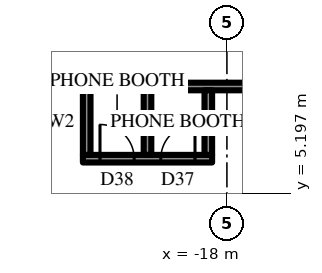
"""IFC4 building model, lengths in metres.
Left out: names, types, materials, properties, quantities, classifications, styles, units other than length and angle.
Written with IfcOpenShell. Run it as: python <this file> out.ifc"""

import sys

from ifc_helpers import new_model, si_unit, direction, frame, frame_2d, origin, place, context, subcontext, project, spatial, rectangle, extrude, element, fill, save


model = new_model("IFC4")
c1 = context("Model", 3, precision=1e-05, world=origin(), true_north=direction((0.0, 1.0)))
c2 = subcontext(c1, "Body", "Model", "MODEL_VIEW")
j1 = project(units=[si_unit("LENGTHUNIT", "METRE"), si_unit("PLANEANGLEUNIT", "RADIAN")], contexts=[c1])
p1 = place(None, origin())
s1 = spatial("IfcSite", under=j1, at=p1, CompositionType="ELEMENT")
p2 = place(p1, origin())
s2 = spatial("IfcBuilding", under=s1, at=p2, CompositionType="ELEMENT")
p3 = place(p2, frame((0.0, 0.0, 249.1)))
s3 = spatial("IfcBuildingStorey", under=s2, at=p3, CompositionType="ELEMENT", Elevation=249.1)
p4 = place(p3, frame((-15.5, 8.0, 0.0), z_axis=(0.0, 0.0, 1.0), x_axis=(-1.0, 0.0, 0.0)))
e1 = element("IfcWall", 1, at=p4, inside=s3, PredefinedType="PARTITIONING", context=c2, shape_type="SweptSolid", body=[
    extrude(rectangle(XDim=13.113, YDim=0.2, at=frame_2d((6.557, 0.0))), origin(), (0.0, 0.0, 1.0), 4.0),
])
p5 = place(p4, frame((0.811, 0.0, 0.0)))
e2 = element("IfcOpeningElement", 2, at=p5, cuts=e1, PredefinedType="OPENING", context=c2, shape_type="SweptSolid", body=[
    extrude(rectangle(XDim=1.0, YDim=2.2, at=frame_2d((0.5, 1.1))), frame((0.0, 0.11, 0.0), z_axis=(0.0, -1.0, 0.0), x_axis=(1.0, 0.0, 0.0)), (0.0, 0.0, 1.0), 0.22),
])
p6 = place(p3, frame((-18.39, 6.1, 0.0), z_axis=(0.0, 0.0, 1.0), x_axis=(-1.0, 0.0, 0.0)))
e3 = element("IfcWall", 3, at=p6, inside=s3, PredefinedType="PARTITIONING", context=c2, shape_type="SweptSolid", body=[
    extrude(rectangle(XDim=3.4, YDim=0.2, at=frame_2d((1.7, 0.0))), origin(), (0.0, 0.0, 1.0), 4.0),
])
p7 = place(p6, frame((0.45, 0.0, 0.0)))
e4 = element("IfcOpeningElement", 4, at=p7, cuts=e3, PredefinedType="OPENING", context=c2, shape_type="SweptSolid", body=[
    extrude(rectangle(XDim=0.9, YDim=2.2, at=frame_2d((0.45, 1.1))), frame((0.0, 0.11, 0.0), z_axis=(0.0, -1.0, 0.0), x_axis=(1.0, 0.0, 0.0)), (0.0, 0.0, 1.0), 0.22),
])
p8 = place(p6, frame((2.05, 0.0, 0.0)))
e5 = element("IfcOpeningElement", 5, at=p8, cuts=e3, PredefinedType="OPENING", context=c2, shape_type="SweptSolid", body=[
    extrude(rectangle(XDim=0.9, YDim=2.2, at=frame_2d((0.45, 1.1))), frame((0.0, 0.11, 0.0), z_axis=(0.0, -1.0, 0.0), x_axis=(1.0, 0.0, 0.0)), (0.0, 0.0, 1.0), 0.22),
])
for number, where, z_axis, x_axis in (
    (6, (-18.49, 7.9, 0.0), (0.0, 0.0, 1.0), (0.0, -1.0, 0.0)),
    (7, (-20.09, 7.9, 0.0), (0.0, 0.0, 1.0), (0.0, -1.0, 0.0)),
    (8, (-21.69, 7.9, 0.0), (0.0, 0.0, 1.0), (0.0, -1.0, 0.0)),
):
    element("IfcWall", number, at=place(p3, frame(where, z_axis=z_axis, x_axis=x_axis)), inside=s3, PredefinedType="PARTITIONING", context=c2, shape_type="SweptSolid", body=[
        extrude(rectangle(XDim=1.7, YDim=0.2, at=frame_2d((0.85, 0.0))), origin(), (0.0, 0.0, 1.0), 4.0),
    ])
p9 = place(p7, frame((0.9, 0.0, 0.0), z_axis=(0.0, 0.0, 1.0), x_axis=(-1.0, 0.0, 0.0)))
e9 = element("IfcDoor", 9, at=p9, inside=s3, OperationType="SINGLE_SWING_LEFT", PredefinedType="DOOR", context=c2, shape_type="SweptSolid", body=[
    extrude(rectangle(XDim=0.9, YDim=2.2, at=frame_2d((0.45, 1.1))), frame((0.0, 0.025, 0.0), z_axis=(0.0, -1.0, 0.0), x_axis=(1.0, 0.0, 0.0)), (0.0, 0.0, 1.0), 0.05),
])
fill(e4, e9)
p10 = place(p8, frame((0.9, 0.0, 0.0), z_axis=(0.0, 0.0, 1.0), x_axis=(-1.0, 0.0, 0.0)))
e10 = element("IfcDoor", 10, at=p10, inside=s3, OperationType="SINGLE_SWING_RIGHT", PredefinedType="DOOR", context=c2, shape_type="SweptSolid", body=[
    extrude(rectangle(XDim=0.9, YDim=2.2, at=frame_2d((0.45, 1.1))), frame((0.0, 0.025, 0.0), z_axis=(0.0, -1.0, 0.0), x_axis=(1.0, 0.0, 0.0)), (0.0, 0.0, 1.0), 0.05),
])
fill(e5, e10)
save(model, sys.argv[1])
